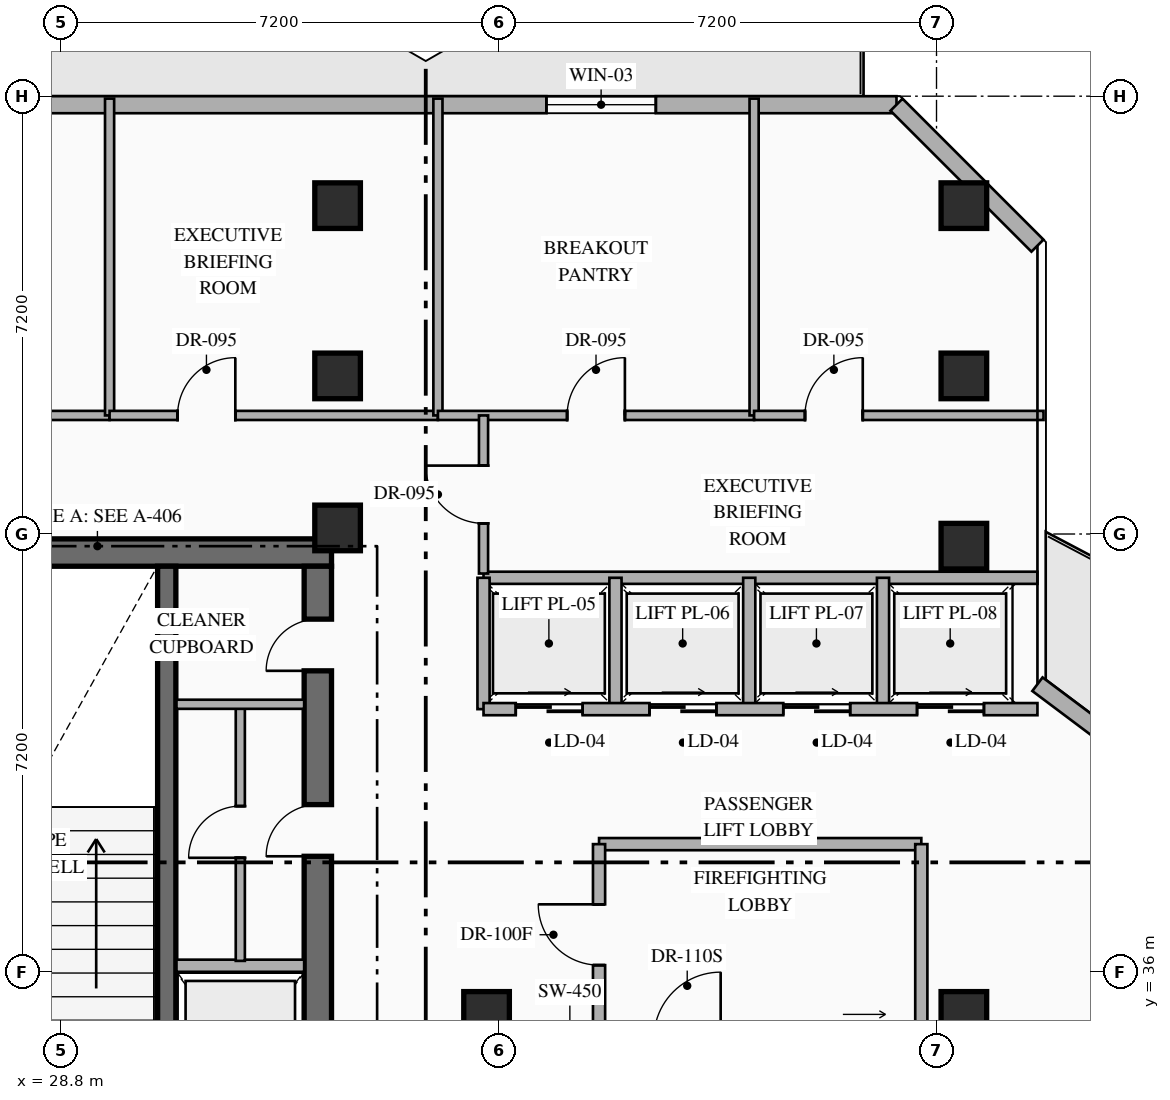
"""IFC4 building model, lengths in metres.
Left out: names, types, materials, properties, quantities, classifications, styles, units other than length and angle.
Written with IfcOpenShell. Run it as: python <this file> out.ifc"""

import sys

from ifc_helpers import new_model, si_unit, direction, frame, frame_2d, origin, origin_2d, place, context, subcontext, project, spatial, rectangle, hollow_rectangle, extrude, element, fill, save


model = new_model("IFC4")
c1 = context("Model", 3, precision=1e-05, world=origin(), true_north=direction((0.0, 1.0)))
c2 = subcontext(c1, "Body", "Model", "MODEL_VIEW")
j1 = project(units=[si_unit("LENGTHUNIT", "METRE"), si_unit("PLANEANGLEUNIT", "RADIAN")], contexts=[c1])
p1 = place(None, origin())
s1 = spatial("IfcSite", under=j1, at=p1, CompositionType="ELEMENT")
p2 = place(p1, origin())
s2 = spatial("IfcBuilding", under=s1, at=p2, CompositionType="ELEMENT")
p3 = place(p2, frame((0.0, 0.0, 209.55)))
s3 = spatial("IfcBuildingStorey", under=s2, at=p3, CompositionType="ELEMENT", Elevation=209.55)
p4 = place(p3, frame((25.77, 42.895, 0.0), z_axis=(0.0, 0.0, 1.0), x_axis=(1.0, 0.0, 0.0)))
e1 = element("IfcWall", 1, at=p4, inside=s3, PredefinedType="SHEAR", context=c2, shape_type="SweptSolid", body=[
    extrude(rectangle(XDim=7.48, YDim=0.45, at=frame_2d((3.74, 0.0))), origin(), (0.0, 0.0, 1.0), 3.6),
])
p5 = place(p3, frame((33.025, 33.19, 0.0), z_axis=(0.0, 0.0, 1.0), x_axis=(0.0, 1.0, 0.0)))
e2 = element("IfcWall", 2, at=p5, inside=s3, PredefinedType="SHEAR", context=c2, shape_type="SweptSolid", body=[
    extrude(rectangle(XDim=9.48, YDim=0.45, at=frame_2d((4.74, 0.0))), origin(), (0.0, 0.0, 1.0), 3.6),
])
p6 = place(p5, frame((4.71, 0.0, 0.0)))
e3 = element("IfcOpeningElement", 3, at=p6, cuts=e2, PredefinedType="OPENING", context=c2, shape_type="SweptSolid", body=[
    extrude(rectangle(XDim=0.85, YDim=2.08, at=frame_2d((0.425, 1.04))), frame((0.0, 0.235, 0.0), z_axis=(0.0, -1.0, 0.0), x_axis=(1.0, 0.0, 0.0)), (0.0, 0.0, 1.0), 0.47),
])
p7 = place(p5, frame((7.76, 0.0, 0.0)))
e4 = element("IfcOpeningElement", 4, at=p7, cuts=e2, PredefinedType="OPENING", context=c2, shape_type="SweptSolid", body=[
    extrude(rectangle(XDim=0.85, YDim=2.08, at=frame_2d((0.425, 1.04))), frame((0.0, 0.235, 0.0), z_axis=(0.0, -1.0, 0.0), x_axis=(1.0, 0.0, 0.0)), (0.0, 0.0, 1.0), 0.47),
])
p8 = place(p3, frame((30.54, 33.19, 0.0), z_axis=(0.0, 0.0, 1.0), x_axis=(0.0, 1.0, 0.0)))
e5 = element("IfcWall", 5, at=p8, inside=s3, PredefinedType="SHEAR", context=c2, shape_type="SweptSolid", body=[
    extrude(rectangle(XDim=9.48, YDim=0.3, at=frame_2d((4.74, 0.0))), origin(), (0.0, 0.0, 1.0), 3.6),
])
for number, where, z_axis, x_axis in (
    (6, (33.35, 43.3, 0.0), (0.0, 0.0, 1.0), (1.0, 0.0, 0.0)),
    (7, (35.8, 35.3, 0.0), (0.0, 0.0, 1.0), (1.0, 0.0, 0.0)),
    (8, (43.65, 35.3, 0.0), (0.0, 0.0, 1.0), (1.0, 0.0, 0.0)),
    (9, (43.65, 43.0, 0.0), (0.0, 0.0, 1.0), (1.0, 0.0, 0.0)),
    (10, (33.35, 45.8, 0.0), (0.0, 0.0, 1.0), (1.0, 0.0, 0.0)),
    (11, (43.65, 45.8, 0.0), (0.0, 0.0, 1.0), (1.0, 0.0, 0.0)),
    (12, (33.35, 48.6, 0.0), (0.0, 0.0, 1.0), (1.0, 0.0, 0.0)),
    (13, (43.65, 48.6, 0.0), (0.0, 0.0, 1.0), (1.0, 0.0, 0.0)),
):
    element("IfcColumn", number, at=place(p3, frame(where, z_axis=z_axis, x_axis=x_axis)), inside=s3, PredefinedType="COLUMN", context=c2, shape_type="SweptSolid", body=[
        extrude(hollow_rectangle(XDim=0.75, YDim=0.75, WallThickness=0.028, at=origin_2d()), origin(), (0.0, 0.0, 1.0), 3.6),
    ])
p9 = place(p3, frame((44.86, 40.73, 0.0), z_axis=(0.0, 0.0, 1.0), x_axis=(0.800007624502, -0.599989833863, 0.0)))
e14 = element("IfcWall", 14, at=p9, inside=s3, PredefinedType="STANDARD", context=c2, shape_type="SweptSolid", body=[
    extrude(rectangle(XDim=19.212, YDim=0.28, at=frame_2d((9.606, 0.0))), origin(), (0.0, 0.0, 1.0), 3.35),
])
p10 = place(p9, frame((1.755, 0.0, 0.0)))
e15 = element("IfcOpeningElement", 15, at=p10, cuts=e14, PredefinedType="OPENING", context=c2, shape_type="SweptSolid", body=[
    extrude(rectangle(XDim=1.1, YDim=2.2, at=frame_2d((0.55, 1.1))), frame((0.0, 0.15, 0.0), z_axis=(0.0, -1.0, 0.0), x_axis=(1.0, 0.0, 0.0)), (0.0, 0.0, 1.0), 0.3),
])
p11 = place(p9, frame((13.509, 0.0, 0.85)))
e16 = element("IfcOpeningElement", 16, at=p11, cuts=e14, PredefinedType="OPENING", context=c2, shape_type="SweptSolid", body=[
    extrude(rectangle(XDim=1.8, YDim=2.1, at=frame_2d((0.9, 1.05))), frame((0.0, 0.15, 0.0), z_axis=(0.0, -1.0, 0.0), x_axis=(1.0, 0.0, 0.0)), (0.0, 0.0, 1.0), 0.3),
])
p12 = place(p3, frame((20.458, 50.26, 0.0), z_axis=(0.0, 0.0, 1.0), x_axis=(1.0, 0.0, 0.0)))
e17 = element("IfcWall", 17, at=p12, inside=s3, PredefinedType="STANDARD", context=c2, shape_type="SweptSolid", body=[
    extrude(rectangle(XDim=22.084, YDim=0.28, at=frame_2d((11.042, 0.0))), origin(), (0.0, 0.0, 1.0), 3.35),
])
p13 = place(p12, frame((2.1, 0.0, 0.0)))
e18 = element("IfcOpeningElement", 18, at=p13, cuts=e17, PredefinedType="OPENING", context=c2, shape_type="SweptSolid", body=[
    extrude(rectangle(XDim=1.1, YDim=2.2, at=frame_2d((0.55, 1.1))), frame((0.0, 0.15, 0.0), z_axis=(0.0, -1.0, 0.0), x_axis=(1.0, 0.0, 0.0)), (0.0, 0.0, 1.0), 0.3),
])
p14 = place(p12, frame((16.326, 0.0, 0.85)))
e19 = element("IfcOpeningElement", 19, at=p14, cuts=e17, PredefinedType="OPENING", context=c2, shape_type="SweptSolid", body=[
    extrude(rectangle(XDim=1.8, YDim=2.1, at=frame_2d((0.9, 1.05))), frame((0.0, 0.15, 0.0), z_axis=(0.0, -1.0, 0.0), x_axis=(1.0, 0.0, 0.0)), (0.0, 0.0, 1.0), 0.3),
])
p15 = place(p3, frame((42.542, 50.26, 0.0), z_axis=(0.0, 0.0, 1.0), x_axis=(0.707106781187, -0.707106781187, 0.0)))
e20 = element("IfcWall", 20, at=p15, inside=s3, PredefinedType="STANDARD", context=c2, shape_type="SweptSolid", body=[
    extrude(rectangle(XDim=3.278, YDim=0.28, at=frame_2d((1.639, 0.0))), origin(), (0.0, 0.0, 1.0), 3.35),
])
p16 = place(p3, frame((30.7, 36.1, 0.0), z_axis=(0.0, 0.0, 1.0), x_axis=(1.0, 0.0, 0.0)))
e21 = element("IfcWall", 21, at=p16, inside=s3, PredefinedType="STANDARD", context=c2, shape_type="SweptSolid", body=[
    extrude(rectangle(XDim=2.1, YDim=0.2, at=frame_2d((1.05, 0.0))), origin(), (0.0, 0.0, 1.0), 3.35),
])
p17 = place(p3, frame((31.75, 36.18, 0.0), z_axis=(0.0, 0.0, 1.0), x_axis=(0.0, 1.0, 0.0)))
e22 = element("IfcWall", 22, at=p17, inside=s3, PredefinedType="PARTITIONING", context=c2, shape_type="SweptSolid", body=[
    extrude(rectangle(XDim=4.24, YDim=0.15, at=frame_2d((2.12, 0.0))), origin(), (0.0, 0.0, 1.0), 3.35),
])
p18 = place(p17, frame((1.695, 0.0, 0.0)))
e23 = element("IfcOpeningElement", 23, at=p18, cuts=e22, PredefinedType="OPENING", context=c2, shape_type="SweptSolid", body=[
    extrude(rectangle(XDim=0.85, YDim=2.08, at=frame_2d((0.425, 1.04))), frame((0.0, 0.085, 0.0), z_axis=(0.0, -1.0, 0.0), x_axis=(1.0, 0.0, 0.0)), (0.0, 0.0, 1.0), 0.17),
])
p19 = place(p3, frame((30.7, 40.4, 0.0), z_axis=(0.0, 0.0, 1.0), x_axis=(1.0, 0.0, 0.0)))
e24 = element("IfcWall", 24, at=p19, inside=s3, PredefinedType="PARTITIONING", context=c2, shape_type="SweptSolid", body=[
    extrude(rectangle(XDim=2.1, YDim=0.15, at=frame_2d((1.05, 0.0))), origin(), (0.0, 0.0, 1.0), 3.35),
])
p20 = place(p3, frame((37.65, 38.1, 0.0), z_axis=(0.0, 0.0, 1.0), x_axis=(1.0, 0.0, 0.0)))
e25 = element("IfcWall", 25, at=p20, inside=s3, PredefinedType="STANDARD", context=c2, shape_type="SweptSolid", body=[
    extrude(rectangle(XDim=5.3, YDim=0.2, at=frame_2d((2.65, 0.0))), origin(), (0.0, 0.0, 1.0), 3.35),
])
p21 = place(p3, frame((42.95, 35.12, 0.0), z_axis=(0.0, 0.0, 1.0), x_axis=(0.0, 1.0, 0.0)))
e26 = element("IfcWall", 26, at=p21, inside=s3, PredefinedType="STANDARD", context=c2, shape_type="SweptSolid", body=[
    extrude(rectangle(XDim=2.98, YDim=0.2, at=frame_2d((1.49, 0.0))), origin(), (0.0, 0.0, 1.0), 3.35),
])
p22 = place(p3, frame((37.65, 35.12, 0.0), z_axis=(0.0, 0.0, 1.0), x_axis=(0.0, 1.0, 0.0)))
e27 = element("IfcWall", 27, at=p22, inside=s3, PredefinedType="STANDARD", context=c2, shape_type="SweptSolid", body=[
    extrude(rectangle(XDim=2.98, YDim=0.2, at=frame_2d((1.49, 0.0))), origin(), (0.0, 0.0, 1.0), 3.35),
])
p23 = place(p22, frame((0.99, 0.0, 0.0)))
e28 = element("IfcOpeningElement", 28, at=p23, cuts=e27, PredefinedType="OPENING", context=c2, shape_type="SweptSolid", body=[
    extrude(rectangle(XDim=1.0, YDim=2.2, at=frame_2d((0.5, 1.1))), frame((0.0, 0.11, 0.0), z_axis=(0.0, -1.0, 0.0), x_axis=(1.0, 0.0, 0.0)), (0.0, 0.0, 1.0), 0.22),
])
p24 = place(p3, frame((35.75, 42.48, 0.0), z_axis=(0.0, 0.0, 1.0), x_axis=(1.0, 0.0, 0.0)))
e29 = element("IfcWall", 29, at=p24, inside=s3, PredefinedType="STANDARD", context=c2, shape_type="SweptSolid", body=[
    extrude(rectangle(XDim=9.11, YDim=0.2, at=frame_2d((4.555, 0.0))), origin(), (0.0, 0.0, 1.0), 3.35),
])
for number, where, z_axis, x_axis in (
    (30, (35.75, 40.32, 0.0), (0.0, 0.0, 1.0), (0.0, 1.0, 0.0)),
    (31, (37.92, 40.32, 0.0), (0.0, 0.0, 1.0), (0.0, 1.0, 0.0)),
    (32, (40.12, 40.32, 0.0), (0.0, 0.0, 1.0), (0.0, 1.0, 0.0)),
    (33, (42.32, 40.32, 0.0), (0.0, 0.0, 1.0), (0.0, 1.0, 0.0)),
):
    element("IfcWall", number, at=place(p3, frame(where, z_axis=z_axis, x_axis=x_axis)), inside=s3, PredefinedType="STANDARD", context=c2, shape_type="SweptSolid", body=[
        extrude(rectangle(XDim=2.16, YDim=0.2, at=frame_2d((1.08, 0.0))), origin(), (0.0, 0.0, 1.0), 3.35),
    ])
p25 = place(p3, frame((35.75, 40.32, 0.0), z_axis=(0.0, 0.0, 1.0), x_axis=(1.0, 0.0, 0.0)))
e34 = element("IfcWall", 34, at=p25, inside=s3, PredefinedType="STANDARD", context=c2, shape_type="SweptSolid", body=[
    extrude(rectangle(XDim=9.11, YDim=0.2, at=frame_2d((4.555, 0.0))), origin(), (0.0, 0.0, 1.0), 3.35),
])
p26 = place(p25, frame((0.53, 0.0, 0.0)))
e35 = element("IfcOpeningElement", 35, at=p26, cuts=e34, PredefinedType="OPENING", context=c2, shape_type="SweptSolid", body=[
    extrude(rectangle(XDim=1.1, YDim=2.18, at=frame_2d((0.55, 1.09))), frame((0.0, 0.11, 0.0), z_axis=(0.0, -1.0, 0.0), x_axis=(1.0, 0.0, 0.0)), (0.0, 0.0, 1.0), 0.22),
])
p27 = place(p25, frame((2.73, 0.0, 0.0)))
e36 = element("IfcOpeningElement", 36, at=p27, cuts=e34, PredefinedType="OPENING", context=c2, shape_type="SweptSolid", body=[
    extrude(rectangle(XDim=1.1, YDim=2.18, at=frame_2d((0.55, 1.09))), frame((0.0, 0.11, 0.0), z_axis=(0.0, -1.0, 0.0), x_axis=(1.0, 0.0, 0.0)), (0.0, 0.0, 1.0), 0.22),
])
p28 = place(p25, frame((4.93, 0.0, 0.0)))
e37 = element("IfcOpeningElement", 37, at=p28, cuts=e34, PredefinedType="OPENING", context=c2, shape_type="SweptSolid", body=[
    extrude(rectangle(XDim=1.1, YDim=2.18, at=frame_2d((0.55, 1.09))), frame((0.0, 0.11, 0.0), z_axis=(0.0, -1.0, 0.0), x_axis=(1.0, 0.0, 0.0)), (0.0, 0.0, 1.0), 0.22),
])
p29 = place(p25, frame((7.13, 0.0, 0.0)))
e38 = element("IfcOpeningElement", 38, at=p29, cuts=e34, PredefinedType="OPENING", context=c2, shape_type="SweptSolid", body=[
    extrude(rectangle(XDim=1.1, YDim=2.18, at=frame_2d((0.55, 1.09))), frame((0.0, 0.11, 0.0), z_axis=(0.0, -1.0, 0.0), x_axis=(1.0, 0.0, 0.0)), (0.0, 0.0, 1.0), 0.22),
])
p30 = place(p3, frame((24.8, 45.15, 0.0), z_axis=(0.0, 0.0, 1.0), x_axis=(1.0, 0.0, 0.0)))
e39 = element("IfcWall", 39, at=p30, inside=s3, PredefinedType="PARTITIONING", context=c2, shape_type="SweptSolid", body=[
    extrude(rectangle(XDim=4.8, YDim=0.15, at=frame_2d((2.4, 0.0))), origin(), (0.0, 0.0, 1.0), 3.35),
])
p31 = place(p30, frame((2.389, 0.0, 0.0)))
e40 = element("IfcOpeningElement", 40, at=p31, cuts=e39, PredefinedType="OPENING", context=c2, shape_type="SweptSolid", body=[
    extrude(rectangle(XDim=0.95, YDim=2.15, at=frame_2d((0.475, 1.075))), frame((0.0, 0.085, 0.0), z_axis=(0.0, -1.0, 0.0), x_axis=(1.0, 0.0, 0.0)), (0.0, 0.0, 1.0), 0.17),
])
p32 = place(p3, frame((29.6, 45.15, 0.0), z_axis=(0.0, 0.0, 1.0), x_axis=(0.0, 1.0, 0.0)))
e41 = element("IfcWall", 41, at=p32, inside=s3, PredefinedType="PARTITIONING", context=c2, shape_type="SweptSolid", body=[
    extrude(rectangle(XDim=5.21, YDim=0.15, at=frame_2d((2.605, 0.0))), origin(), (0.0, 0.0, 1.0), 3.35),
])
p33 = place(p3, frame((29.6, 45.15, 0.0), z_axis=(0.0, 0.0, 1.0), x_axis=(1.0, 0.0, 0.0)))
e42 = element("IfcWall", 42, at=p33, inside=s3, PredefinedType="PARTITIONING", context=c2, shape_type="SweptSolid", body=[
    extrude(rectangle(XDim=5.4, YDim=0.15, at=frame_2d((2.7, 0.0))), origin(), (0.0, 0.0, 1.0), 3.35),
])
p34 = place(p33, frame((1.118, 0.0, 0.0)))
e43 = element("IfcOpeningElement", 43, at=p34, cuts=e42, PredefinedType="OPENING", context=c2, shape_type="SweptSolid", body=[
    extrude(rectangle(XDim=0.95, YDim=2.15, at=frame_2d((0.475, 1.075))), frame((0.0, 0.085, 0.0), z_axis=(0.0, -1.0, 0.0), x_axis=(1.0, 0.0, 0.0)), (0.0, 0.0, 1.0), 0.17),
])
p35 = place(p3, frame((35.0, 45.15, 0.0), z_axis=(0.0, 0.0, 1.0), x_axis=(0.0, 1.0, 0.0)))
e44 = element("IfcWall", 44, at=p35, inside=s3, PredefinedType="PARTITIONING", context=c2, shape_type="SweptSolid", body=[
    extrude(rectangle(XDim=5.21, YDim=0.15, at=frame_2d((2.605, 0.0))), origin(), (0.0, 0.0, 1.0), 3.35),
])
p36 = place(p3, frame((35.0, 45.15, 0.0), z_axis=(0.0, 0.0, 1.0), x_axis=(1.0, 0.0, 0.0)))
e45 = element("IfcWall", 45, at=p36, inside=s3, PredefinedType="PARTITIONING", context=c2, shape_type="SweptSolid", body=[
    extrude(rectangle(XDim=5.2, YDim=0.15, at=frame_2d((2.6, 0.0))), origin(), (0.0, 0.0, 1.0), 3.35),
])
p37 = place(p36, frame((2.125, 0.0, 0.0)))
e46 = element("IfcOpeningElement", 46, at=p37, cuts=e45, PredefinedType="OPENING", context=c2, shape_type="SweptSolid", body=[
    extrude(rectangle(XDim=0.95, YDim=2.15, at=frame_2d((0.475, 1.075))), frame((0.0, 0.085, 0.0), z_axis=(0.0, -1.0, 0.0), x_axis=(1.0, 0.0, 0.0)), (0.0, 0.0, 1.0), 0.17),
])
p38 = place(p3, frame((40.2, 45.15, 0.0), z_axis=(0.0, 0.0, 1.0), x_axis=(0.0, 1.0, 0.0)))
e47 = element("IfcWall", 47, at=p38, inside=s3, PredefinedType="PARTITIONING", context=c2, shape_type="SweptSolid", body=[
    extrude(rectangle(XDim=5.21, YDim=0.15, at=frame_2d((2.605, 0.0))), origin(), (0.0, 0.0, 1.0), 3.35),
])
p39 = place(p3, frame((40.2, 45.15, 0.0), z_axis=(0.0, 0.0, 1.0), x_axis=(1.0, 0.0, 0.0)))
e48 = element("IfcWall", 48, at=p39, inside=s3, PredefinedType="PARTITIONING", context=c2, shape_type="SweptSolid", body=[
    extrude(rectangle(XDim=4.76, YDim=0.15, at=frame_2d((2.38, 0.0))), origin(), (0.0, 0.0, 1.0), 3.35),
])
p40 = place(p39, frame((0.837, 0.0, 0.0)))
e49 = element("IfcOpeningElement", 49, at=p40, cuts=e48, PredefinedType="OPENING", context=c2, shape_type="SweptSolid", body=[
    extrude(rectangle(XDim=0.95, YDim=2.15, at=frame_2d((0.475, 1.075))), frame((0.0, 0.085, 0.0), z_axis=(0.0, -1.0, 0.0), x_axis=(1.0, 0.0, 0.0)), (0.0, 0.0, 1.0), 0.17),
])
p41 = place(p3, frame((43.48, 31.773, 0.0), z_axis=(0.0, 0.0, 1.0), x_axis=(0.599971041729, 0.800021717885, 0.0)))
e50 = element("IfcWall", 50, at=p41, inside=s3, PredefinedType="PARTITIONING", context=c2, shape_type="SweptSolid", body=[
    extrude(rectangle(XDim=8.094, YDim=0.15, at=frame_2d((4.047, 0.0))), origin(), (0.0, 0.0, 1.0), 3.35),
])
p42 = place(p3, frame((35.75, 42.55, 0.0), z_axis=(0.0, 0.0, 1.0), x_axis=(0.0, 1.0, 0.0)))
e51 = element("IfcWall", 51, at=p42, inside=s3, PredefinedType="PARTITIONING", context=c2, shape_type="SweptSolid", body=[
    extrude(rectangle(XDim=2.6, YDim=0.15, at=frame_2d((1.3, 0.0))), origin(), (0.0, 0.0, 1.0), 3.35),
])
p43 = place(p42, frame((0.825, 0.0, 0.0)))
e52 = element("IfcOpeningElement", 52, at=p43, cuts=e51, PredefinedType="OPENING", context=c2, shape_type="SweptSolid", body=[
    extrude(rectangle(XDim=0.95, YDim=2.15, at=frame_2d((0.475, 1.075))), frame((0.0, 0.085, 0.0), z_axis=(0.0, -1.0, 0.0), x_axis=(1.0, 0.0, 0.0)), (0.0, 0.0, 1.0), 0.17),
])
p44 = place(p14, origin())
e53 = element("IfcWindow", 53, at=p44, inside=s3, PartitioningType="SINGLE_PANEL", PredefinedType="WINDOW", context=c2, shape_type="SweptSolid", body=[
    extrude(rectangle(XDim=1.8, YDim=2.1, at=frame_2d((0.9, 1.05))), frame((0.0, 0.03, 0.0), z_axis=(0.0, -1.0, 0.0), x_axis=(1.0, 0.0, 0.0)), (0.0, 0.0, 1.0), 0.06),
])
fill(e19, e53)
p45 = place(p6, origin())
e54 = element("IfcDoor", 54, at=p45, inside=s3, OperationType="SINGLE_SWING_LEFT", PredefinedType="DOOR", context=c2, shape_type="SweptSolid", body=[
    extrude(rectangle(XDim=0.85, YDim=2.08, at=frame_2d((0.425, 1.04))), frame((0.0, 0.025, 0.0), z_axis=(0.0, -1.0, 0.0), x_axis=(1.0, 0.0, 0.0)), (0.0, 0.0, 1.0), 0.05),
])
fill(e3, e54)
p46 = place(p7, origin())
e55 = element("IfcDoor", 55, at=p46, inside=s3, OperationType="SINGLE_SWING_LEFT", PredefinedType="DOOR", context=c2, shape_type="SweptSolid", body=[
    extrude(rectangle(XDim=0.85, YDim=2.08, at=frame_2d((0.425, 1.04))), frame((0.0, 0.025, 0.0), z_axis=(0.0, -1.0, 0.0), x_axis=(1.0, 0.0, 0.0)), (0.0, 0.0, 1.0), 0.05),
])
fill(e4, e55)
p47 = place(p18, origin())
e56 = element("IfcDoor", 56, at=p47, inside=s3, OperationType="SINGLE_SWING_LEFT", PredefinedType="DOOR", context=c2, shape_type="SweptSolid", body=[
    extrude(rectangle(XDim=0.85, YDim=2.08, at=frame_2d((0.425, 1.04))), frame((0.0, 0.025, 0.0), z_axis=(0.0, -1.0, 0.0), x_axis=(1.0, 0.0, 0.0)), (0.0, 0.0, 1.0), 0.05),
])
fill(e23, e56)
p48 = place(p23, origin())
e57 = element("IfcDoor", 57, at=p48, inside=s3, OperationType="SINGLE_SWING_RIGHT", PredefinedType="DOOR", context=c2, shape_type="SweptSolid", body=[
    extrude(rectangle(XDim=1.0, YDim=2.2, at=frame_2d((0.5, 1.1))), frame((0.0, 0.025, 0.0), z_axis=(0.0, -1.0, 0.0), x_axis=(1.0, 0.0, 0.0)), (0.0, 0.0, 1.0), 0.05),
])
fill(e28, e57)
p49 = place(p26, origin())
e58 = element("IfcDoor", 58, at=p49, inside=s3, OperationType="SLIDING_TO_RIGHT", PredefinedType="USERDEFINED", context=c2, shape_type="SweptSolid", body=[
    extrude(rectangle(XDim=1.1, YDim=2.18, at=frame_2d((0.55, 1.09))), frame((0.0, 0.025, 0.0), z_axis=(0.0, -1.0, 0.0), x_axis=(1.0, 0.0, 0.0)), (0.0, 0.0, 1.0), 0.05),
])
fill(e35, e58)
p50 = place(p27, origin())
e59 = element("IfcDoor", 59, at=p50, inside=s3, OperationType="SLIDING_TO_RIGHT", PredefinedType="USERDEFINED", context=c2, shape_type="SweptSolid", body=[
    extrude(rectangle(XDim=1.1, YDim=2.18, at=frame_2d((0.55, 1.09))), frame((0.0, 0.025, 0.0), z_axis=(0.0, -1.0, 0.0), x_axis=(1.0, 0.0, 0.0)), (0.0, 0.0, 1.0), 0.05),
])
fill(e36, e59)
p51 = place(p28, origin())
e60 = element("IfcDoor", 60, at=p51, inside=s3, OperationType="SLIDING_TO_RIGHT", PredefinedType="USERDEFINED", context=c2, shape_type="SweptSolid", body=[
    extrude(rectangle(XDim=1.1, YDim=2.18, at=frame_2d((0.55, 1.09))), frame((0.0, 0.025, 0.0), z_axis=(0.0, -1.0, 0.0), x_axis=(1.0, 0.0, 0.0)), (0.0, 0.0, 1.0), 0.05),
])
fill(e37, e60)
p52 = place(p29, origin())
e61 = element("IfcDoor", 61, at=p52, inside=s3, OperationType="SLIDING_TO_RIGHT", PredefinedType="USERDEFINED", context=c2, shape_type="SweptSolid", body=[
    extrude(rectangle(XDim=1.1, YDim=2.18, at=frame_2d((0.55, 1.09))), frame((0.0, 0.025, 0.0), z_axis=(0.0, -1.0, 0.0), x_axis=(1.0, 0.0, 0.0)), (0.0, 0.0, 1.0), 0.05),
])
fill(e38, e61)
p53 = place(p34, origin())
e62 = element("IfcDoor", 62, at=p53, inside=s3, OperationType="SINGLE_SWING_RIGHT", PredefinedType="DOOR", context=c2, shape_type="SweptSolid", body=[
    extrude(rectangle(XDim=0.95, YDim=2.15, at=frame_2d((0.475, 1.075))), frame((0.0, 0.025, 0.0), z_axis=(0.0, -1.0, 0.0), x_axis=(1.0, 0.0, 0.0)), (0.0, 0.0, 1.0), 0.05),
])
fill(e43, e62)
p54 = place(p37, origin())
e63 = element("IfcDoor", 63, at=p54, inside=s3, OperationType="SINGLE_SWING_RIGHT", PredefinedType="DOOR", context=c2, shape_type="SweptSolid", body=[
    extrude(rectangle(XDim=0.95, YDim=2.15, at=frame_2d((0.475, 1.075))), frame((0.0, 0.025, 0.0), z_axis=(0.0, -1.0, 0.0), x_axis=(1.0, 0.0, 0.0)), (0.0, 0.0, 1.0), 0.05),
])
fill(e46, e63)
p55 = place(p40, origin())
e64 = element("IfcDoor", 64, at=p55, inside=s3, OperationType="SINGLE_SWING_RIGHT", PredefinedType="DOOR", context=c2, shape_type="SweptSolid", body=[
    extrude(rectangle(XDim=0.95, YDim=2.15, at=frame_2d((0.475, 1.075))), frame((0.0, 0.025, 0.0), z_axis=(0.0, -1.0, 0.0), x_axis=(1.0, 0.0, 0.0)), (0.0, 0.0, 1.0), 0.05),
])
fill(e49, e64)
p56 = place(p43, origin())
e65 = element("IfcDoor", 65, at=p56, inside=s3, OperationType="SINGLE_SWING_RIGHT", PredefinedType="DOOR", context=c2, shape_type="SweptSolid", body=[
    extrude(rectangle(XDim=0.95, YDim=2.15, at=frame_2d((0.475, 1.075))), frame((0.0, 0.025, 0.0), z_axis=(0.0, -1.0, 0.0), x_axis=(1.0, 0.0, 0.0)), (0.0, 0.0, 1.0), 0.05),
])
fill(e52, e65)
save(model, sys.argv[1])
